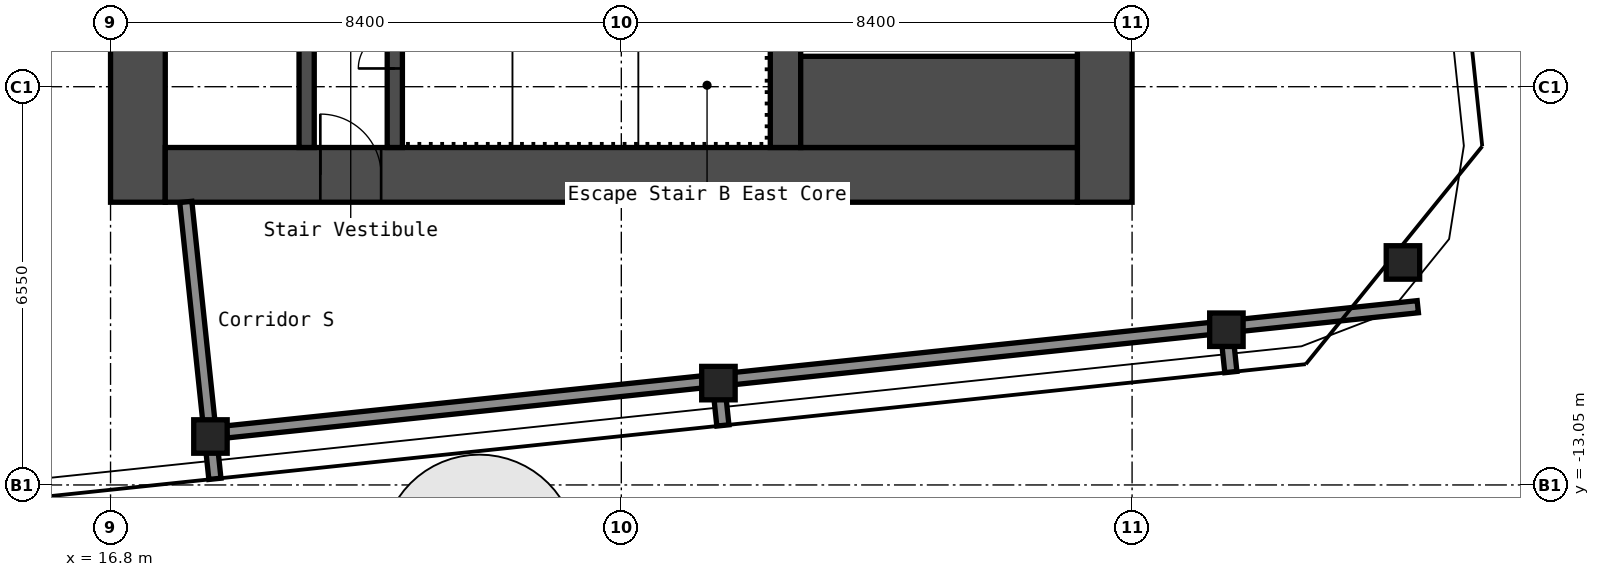
"""IFC4 building model, lengths in metres.
Left out: names, types, materials, properties, quantities, classifications, styles, units other than length and angle.
Written with IfcOpenShell. Run it as: python <this file> out.ifc"""

import sys

from ifc_helpers import new_model, si_unit, direction, frame, frame_2d, origin, origin_2d, place, context, subcontext, project, spatial, rectangle, hollow_rectangle, extrude, element, fill, save


model = new_model("IFC4")
c1 = context("Model", 3, precision=1e-05, world=origin(), true_north=direction((0.0, 1.0)))
c2 = subcontext(c1, "Body", "Model", "MODEL_VIEW")
j1 = project(units=[si_unit("LENGTHUNIT", "METRE"), si_unit("PLANEANGLEUNIT", "RADIAN")], contexts=[c1])
p1 = place(None, origin())
s1 = spatial("IfcSite", under=j1, at=p1, CompositionType="ELEMENT")
p2 = place(p1, origin())
s2 = spatial("IfcBuilding", under=s1, at=p2, CompositionType="ELEMENT")
p3 = place(p2, frame((0.0, 0.0, 248.6)))
s3 = spatial("IfcBuildingStorey", under=s2, at=p3, CompositionType="ELEMENT", Elevation=248.6)
for number, where, z_axis, x_axis in (
    (1, (18.443, -12.253, 0.0), (0.0, 0.0, 1.0), (1.0, 0.0, 0.0)),
    (2, (26.797, -11.375, 0.0), (0.0, 0.0, 1.0), (1.0, 0.0, 0.0)),
    (3, (35.151, -10.497, 0.0), (0.0, 0.0, 1.0), (1.0, 0.0, 0.0)),
    (4, (38.054, -9.39, 0.0), (0.0, 0.0, 1.0), (1.0, 0.0, 0.0)),
):
    element("IfcColumn", number, at=place(p3, frame(where, z_axis=z_axis, x_axis=x_axis)), inside=s3, PredefinedType="COLUMN", context=c2, shape_type="SweptSolid", body=[
        extrude(hollow_rectangle(XDim=0.55, YDim=0.55, WallThickness=0.022, InnerFilletRadius=0.033, OuterFilletRadius=0.055, at=origin_2d()), origin(), (0.0, 0.0, 1.0), 2.75),
    ])
p4 = place(p3, frame((17.25, -8.4, 0.0), z_axis=(0.0, 0.0, 1.0), x_axis=(0.0, 1.0, 0.0)))
e5 = element("IfcWall", 5, at=p4, inside=s3, PredefinedType="SHEAR", context=c2, shape_type="SweptSolid", body=[
    extrude(rectangle(XDim=16.8, YDim=0.9, at=frame_2d((8.4, 0.0))), origin(), (0.0, 0.0, 1.0), 2.75),
])
p5 = place(p4, frame((11.879, 0.0, 0.0)))
e6 = element("IfcOpeningElement", 6, at=p5, cuts=e5, PredefinedType="OPENING", context=c2, shape_type="SweptSolid", body=[
    extrude(rectangle(XDim=1.6, YDim=2.1, at=frame_2d((0.8, 1.05))), frame((0.0, 0.46, 0.0), z_axis=(0.0, -1.0, 0.0), x_axis=(1.0, 0.0, 0.0)), (0.0, 0.0, 1.0), 0.92),
])
p6 = place(p3, frame((33.15, -8.4, 0.0), z_axis=(0.0, 0.0, 1.0), x_axis=(0.0, 1.0, 0.0)))
e7 = element("IfcWall", 7, at=p6, inside=s3, PredefinedType="SHEAR", context=c2, shape_type="SweptSolid", body=[
    extrude(rectangle(XDim=16.8, YDim=0.9, at=frame_2d((8.4, 0.0))), origin(), (0.0, 0.0, 1.0), 2.75),
])
p7 = place(p3, frame((17.7, -7.95, 0.0), z_axis=(0.0, 0.0, 1.0), x_axis=(1.0, 0.0, 0.0)))
e8 = element("IfcWall", 8, at=p7, inside=s3, PredefinedType="SHEAR", context=c2, shape_type="SweptSolid", body=[
    extrude(rectangle(XDim=15.0, YDim=0.9, at=frame_2d((7.5, 0.0))), origin(), (0.0, 0.0, 1.0), 2.75),
])
p8 = place(p7, frame((2.55, 0.0, 0.0)))
e9 = element("IfcOpeningElement", 9, at=p8, cuts=e8, PredefinedType="OPENING", context=c2, shape_type="SweptSolid", body=[
    extrude(rectangle(XDim=1.0, YDim=2.1, at=frame_2d((0.5, 1.05))), frame((0.0, 0.46, 0.0), z_axis=(0.0, -1.0, 0.0), x_axis=(1.0, 0.0, 0.0)), (0.0, 0.0, 1.0), 0.92),
])
p9 = place(p3, frame((20.025, -7.5, 0.0), z_axis=(0.0, 0.0, 1.0), x_axis=(0.0, 1.0, 0.0)))
e10 = element("IfcWall", 10, at=p9, inside=s3, PredefinedType="SHEAR", context=c2, shape_type="SweptSolid", body=[
    extrude(rectangle(XDim=6.3, YDim=0.25, at=frame_2d((3.15, 0.0))), origin(), (0.0, 0.0, 1.0), 2.75),
])
p10 = place(p9, frame((2.4, 0.0, 0.0)))
e11 = element("IfcOpeningElement", 11, at=p10, cuts=e10, PredefinedType="OPENING", context=c2, shape_type="SweptSolid", body=[
    extrude(rectangle(XDim=1.0, YDim=2.1, at=frame_2d((0.5, 1.05))), frame((0.0, 0.135, 0.0), z_axis=(0.0, -1.0, 0.0), x_axis=(1.0, 0.0, 0.0)), (0.0, 0.0, 1.0), 0.27),
])
p11 = place(p3, frame((21.475, -7.5, 0.0), z_axis=(0.0, 0.0, 1.0), x_axis=(0.0, 1.0, 0.0)))
e12 = element("IfcWall", 12, at=p11, inside=s3, PredefinedType="SHEAR", context=c2, shape_type="SweptSolid", body=[
    extrude(rectangle(XDim=3.75, YDim=0.25, at=frame_2d((1.875, 0.0))), origin(), (0.0, 0.0, 1.0), 2.75),
])
p12 = place(p11, frame((1.3, 0.0, 0.0)))
e13 = element("IfcOpeningElement", 13, at=p12, cuts=e12, PredefinedType="OPENING", context=c2, shape_type="SweptSolid", body=[
    extrude(rectangle(XDim=1.2, YDim=2.1, at=frame_2d((0.6, 1.05))), frame((0.0, 0.135, 0.0), z_axis=(0.0, -1.0, 0.0), x_axis=(1.0, 0.0, 0.0)), (0.0, 0.0, 1.0), 0.27),
])
p13 = place(p3, frame((27.9, -7.5, 0.0), z_axis=(0.0, 0.0, 1.0), x_axis=(0.0, 1.0, 0.0)))
e14 = element("IfcWall", 14, at=p13, inside=s3, PredefinedType="SHEAR", context=c2, shape_type="SweptSolid", body=[
    extrude(rectangle(XDim=3.75, YDim=0.5, at=frame_2d((1.875, 0.0))), origin(), (0.0, 0.0, 1.0), 2.75),
])
p14 = place(p3, frame((28.15, -6.75, 0.0), z_axis=(0.0, 0.0, 1.0), x_axis=(1.0, 0.0, 0.0)))
e15 = element("IfcWall", 15, at=p14, inside=s3, PredefinedType="SHEAR", context=c2, shape_type="SweptSolid", body=[
    extrude(rectangle(XDim=4.55, YDim=1.5, at=frame_2d((2.275, 0.0))), origin(), (0.0, 0.0, 1.0), 2.75),
])
p15 = place(p3, frame((18.708, -12.177, 0.0), z_axis=(0.0, 0.0, 1.0), x_axis=(0.994521604238, 0.104531233147, 0.0)))
e16 = element("IfcWall", 16, at=p15, inside=s3, PredefinedType="PARTITIONING", context=c2, shape_type="SweptSolid", body=[
    extrude(rectangle(XDim=19.698, YDim=0.2, at=frame_2d((9.849, 0.0))), origin(), (0.0, 0.0, 1.0), 2.75),
])
p16 = place(p3, frame((18.516, -12.949, 0.0), z_axis=(0.0, 0.0, 1.0), x_axis=(-0.104548796268, 0.994519758074, 0.0)))
e17 = element("IfcWall", 17, at=p16, inside=s3, PredefinedType="PARTITIONING", context=c2, shape_type="SweptSolid", body=[
    extrude(rectangle(XDim=4.579, YDim=0.2, at=frame_2d((2.29, 0.0))), origin(), (0.0, 0.0, 1.0), 2.75),
])
for number, where, z_axis, x_axis in (
    (18, (26.87, -12.071, 0.0), (0.0, 0.0, 1.0), (-0.105, 0.994, 0.0)),
    (19, (35.224, -11.193, 0.0), (0.0, 0.0, 1.0), (-0.105, 0.994, 0.0)),
):
    element("IfcWall", number, at=place(p3, frame(where, z_axis=z_axis, x_axis=x_axis)), inside=s3, PredefinedType="PARTITIONING", context=c2, shape_type="SweptSolid", body=[
        extrude(rectangle(XDim=0.434, YDim=0.2, at=frame_2d((0.217, 0.0))), origin(), (0.0, 0.0, 1.0), 2.75),
    ])
p17 = place(p8, origin())
e20 = element("IfcDoor", 20, at=p17, inside=s3, OperationType="SINGLE_SWING_RIGHT", PredefinedType="DOOR", context=c2, shape_type="SweptSolid", body=[
    extrude(rectangle(XDim=1.0, YDim=2.1, at=frame_2d((0.5, 1.05))), frame((0.0, 0.025, 0.0), z_axis=(0.0, -1.0, 0.0), x_axis=(1.0, 0.0, 0.0)), (0.0, 0.0, 1.0), 0.05),
])
fill(e9, e20)
p18 = place(p12, origin())
e21 = element("IfcDoor", 21, at=p18, inside=s3, OperationType="DOUBLE_DOOR_SINGLE_SWING", PredefinedType="DOOR", context=c2, shape_type="SweptSolid", body=[
    extrude(rectangle(XDim=1.2, YDim=2.1, at=frame_2d((0.6, 1.05))), frame((0.0, 0.025, 0.0), z_axis=(0.0, -1.0, 0.0), x_axis=(1.0, 0.0, 0.0)), (0.0, 0.0, 1.0), 0.05),
])
fill(e13, e21)
save(model, sys.argv[1])
